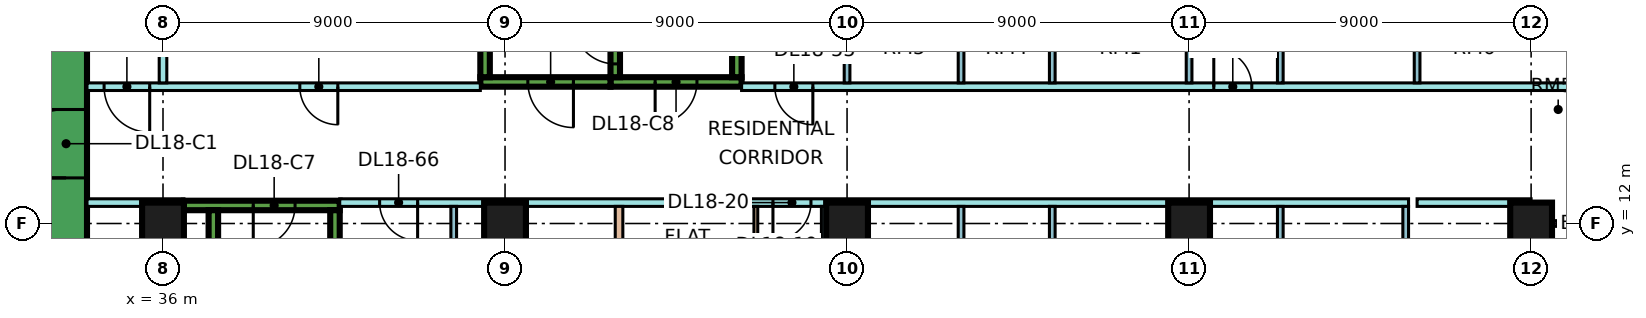
"""IFC4 building model, lengths in metres.
Left out: names, types, materials, properties, quantities, classifications, styles, units other than length and angle.
Written with IfcOpenShell. Run it as: python <this file> out.ifc"""

import sys

from ifc_helpers import new_model, si_unit, direction, frame, frame_2d, origin, origin_2d, place, context, subcontext, project, spatial, rectangle, extrude, element, fill, save


model = new_model("IFC4")
c1 = context("Model", 3, precision=1e-05, world=origin(), true_north=direction((0.0, 1.0)))
c2 = subcontext(c1, "Body", "Model", "MODEL_VIEW")
j1 = project(units=[si_unit("LENGTHUNIT", "METRE"), si_unit("PLANEANGLEUNIT", "RADIAN")], contexts=[c1])
p1 = place(None, origin())
s1 = spatial("IfcSite", under=j1, at=p1, CompositionType="ELEMENT")
p2 = place(p1, origin())
s2 = spatial("IfcBuilding", under=s1, at=p2, CompositionType="ELEMENT")
p3 = place(p2, frame((0.0, 0.0, 82.65)))
s3 = spatial("IfcBuildingStorey", under=s2, at=p3, CompositionType="ELEMENT", Elevation=82.65)
for number, where, z_axis, x_axis in (
    (1, (36.0, 12.0, 0.0), (0.0, 0.0, 1.0), (1.0, 0.0, 0.0)),
    (2, (45.0, 12.0, 0.0), (0.0, 0.0, 1.0), (1.0, 0.0, 0.0)),
    (3, (54.0, 12.0, 0.0), (0.0, 0.0, 1.0), (1.0, 0.0, 0.0)),
    (4, (63.0, 12.0, 0.0), (0.0, 0.0, 1.0), (1.0, 0.0, 0.0)),
    (5, (72.0, 12.0, 0.0), (0.0, 0.0, 1.0), (1.0, 0.0, 0.0)),
):
    element("IfcColumn", number, at=place(p3, frame(where, z_axis=z_axis, x_axis=x_axis)), inside=s3, PredefinedType="COLUMN", context=c2, shape_type="SweptSolid", body=[
        extrude(rectangle(XDim=1.1, YDim=1.1, at=origin_2d()), origin(), (0.0, 0.0, 1.0), 3.75),
    ])
p4 = place(p3, frame((33.45, 8.1, 0.0), z_axis=(0.0, 0.0, 1.0), x_axis=(0.0, 1.0, 0.0)))
e6 = element("IfcWall", 6, at=p4, inside=s3, PredefinedType="SHEAR", context=c2, shape_type="SweptSolid", body=[
    extrude(rectangle(XDim=10.8, YDim=1.1, at=frame_2d((5.4, 0.0))), origin(), (0.0, 0.0, 1.0), 3.75),
])
p5 = place(p4, frame((5.1, 0.0, 0.0)))
e7 = element("IfcOpeningElement", 7, at=p5, cuts=e6, PredefinedType="OPENING", context=c2, shape_type="SweptSolid", body=[
    extrude(rectangle(XDim=1.8, YDim=2.4, at=frame_2d((0.9, 1.2))), frame((0.0, 0.56, 0.0), z_axis=(0.0, -1.0, 0.0), x_axis=(1.0, 0.0, 0.0)), (0.0, 0.0, 1.0), 1.12),
])
p6 = place(p3, frame((36.55, 12.475, 0.0), z_axis=(0.0, 0.0, 1.0), x_axis=(1.0, 0.0, 0.0)))
e8 = element("IfcWall", 8, at=p6, inside=s3, PredefinedType="SHEAR", context=c2, shape_type="SweptSolid", body=[
    extrude(rectangle(XDim=4.1, YDim=0.25, at=frame_2d((2.05, 0.0))), origin(), (0.0, 0.0, 1.0), 3.75),
])
p7 = place(p6, frame((1.825, 0.0, 0.0)))
e9 = element("IfcOpeningElement", 9, at=p7, cuts=e8, PredefinedType="OPENING", context=c2, shape_type="SweptSolid", body=[
    extrude(rectangle(XDim=1.1, YDim=2.2, at=frame_2d((0.55, 1.1))), frame((0.0, 0.135, 0.0), z_axis=(0.0, -1.0, 0.0), x_axis=(1.0, 0.0, 0.0)), (0.0, 0.0, 1.0), 0.27),
])
for number, where, z_axis, x_axis in (
    (10, (37.325, 5.85, 0.0), (0.0, 0.0, 1.0), (0.0, 1.0, 0.0)),
    (11, (40.525, 5.85, 0.0), (0.0, 0.0, 1.0), (0.0, 1.0, 0.0)),
):
    element("IfcWall", number, at=place(p3, frame(where, z_axis=z_axis, x_axis=x_axis)), inside=s3, PredefinedType="SHEAR", context=c2, shape_type="SweptSolid", body=[
        extrude(rectangle(XDim=6.5, YDim=0.25, at=frame_2d((3.25, 0.0))), origin(), (0.0, 0.0, 1.0), 3.75),
    ])
p8 = place(p3, frame((47.775, 15.725, 0.0), z_axis=(0.0, 0.0, 1.0), x_axis=(1.0, 0.0, 0.0)))
e12 = element("IfcWall", 12, at=p8, inside=s3, PredefinedType="SHEAR", context=c2, shape_type="SweptSolid", body=[
    extrude(rectangle(XDim=3.45, YDim=0.25, at=frame_2d((1.725, 0.0))), origin(), (0.0, 0.0, 1.0), 3.75),
])
p9 = place(p8, frame((1.175, 0.0, 0.0)))
e13 = element("IfcOpeningElement", 13, at=p9, cuts=e12, PredefinedType="OPENING", context=c2, shape_type="SweptSolid", body=[
    extrude(rectangle(XDim=1.1, YDim=2.2, at=frame_2d((0.55, 1.1))), frame((0.0, 0.135, 0.0), z_axis=(0.0, -1.0, 0.0), x_axis=(1.0, 0.0, 0.0)), (0.0, 0.0, 1.0), 0.27),
])
p10 = place(p3, frame((47.9, 15.85, 0.0), z_axis=(0.0, 0.0, 1.0), x_axis=(0.0, 1.0, 0.0)))
e14 = element("IfcWall", 14, at=p10, inside=s3, PredefinedType="SHEAR", context=c2, shape_type="SweptSolid", body=[
    extrude(rectangle(XDim=6.5, YDim=0.25, at=frame_2d((3.25, 0.0))), origin(), (0.0, 0.0, 1.0), 3.75),
])
p11 = place(p10, frame((0.35, 0.0, 0.0)))
e15 = element("IfcOpeningElement", 15, at=p11, cuts=e14, PredefinedType="OPENING", context=c2, shape_type="SweptSolid", body=[
    extrude(rectangle(XDim=1.1, YDim=2.2, at=frame_2d((0.55, 1.1))), frame((0.0, 0.135, 0.0), z_axis=(0.0, -1.0, 0.0), x_axis=(1.0, 0.0, 0.0)), (0.0, 0.0, 1.0), 0.27),
])
p12 = place(p3, frame((51.1, 15.85, 0.0), z_axis=(0.0, 0.0, 1.0), x_axis=(0.0, 1.0, 0.0)))
e16 = element("IfcWall", 16, at=p12, inside=s3, PredefinedType="SHEAR", context=c2, shape_type="SweptSolid", body=[
    extrude(rectangle(XDim=6.5, YDim=0.25, at=frame_2d((3.25, 0.0))), origin(), (0.0, 0.0, 1.0), 3.75),
])
p13 = place(p3, frame((44.35, 15.725, 0.0), z_axis=(0.0, 0.0, 1.0), x_axis=(1.0, 0.0, 0.0)))
e17 = element("IfcWall", 17, at=p13, inside=s3, PredefinedType="SHEAR", context=c2, shape_type="SweptSolid", body=[
    extrude(rectangle(XDim=3.425, YDim=0.25, at=frame_2d((1.712, 0.0))), origin(), (0.0, 0.0, 1.0), 3.75),
])
p14 = place(p13, frame((1.25, 0.0, 0.0)))
e18 = element("IfcOpeningElement", 18, at=p14, cuts=e17, PredefinedType="OPENING", context=c2, shape_type="SweptSolid", body=[
    extrude(rectangle(XDim=1.2, YDim=2.2, at=frame_2d((0.6, 1.1))), frame((0.0, 0.135, 0.0), z_axis=(0.0, -1.0, 0.0), x_axis=(1.0, 0.0, 0.0)), (0.0, 0.0, 1.0), 0.27),
])
p15 = place(p3, frame((44.475, 15.85, 0.0), z_axis=(0.0, 0.0, 1.0), x_axis=(0.0, 1.0, 0.0)))
e19 = element("IfcWall", 19, at=p15, inside=s3, PredefinedType="SHEAR", context=c2, shape_type="SweptSolid", body=[
    extrude(rectangle(XDim=6.5, YDim=0.25, at=frame_2d((3.25, 0.0))), origin(), (0.0, 0.0, 1.0), 3.75),
])
p16 = place(p15, frame((1.75, 0.0, 0.0)))
e20 = element("IfcOpeningElement", 20, at=p16, cuts=e19, PredefinedType="OPENING", context=c2, shape_type="SweptSolid", body=[
    extrude(rectangle(XDim=1.1, YDim=2.2, at=frame_2d((0.55, 1.1))), frame((0.0, 0.135, 0.0), z_axis=(0.0, -1.0, 0.0), x_axis=(1.0, 0.0, 0.0)), (0.0, 0.0, 1.0), 0.27),
])
p17 = place(p15, frame((4.3, 0.0, 0.0)))
e21 = element("IfcOpeningElement", 21, at=p17, cuts=e19, PredefinedType="OPENING", context=c2, shape_type="SweptSolid", body=[
    extrude(rectangle(XDim=1.1, YDim=2.2, at=frame_2d((0.55, 1.1))), frame((0.0, 0.135, 0.0), z_axis=(0.0, -1.0, 0.0), x_axis=(1.0, 0.0, 0.0)), (0.0, 0.0, 1.0), 0.27),
])
p18 = place(p3, frame((72.0, 1.575, 0.0), z_axis=(0.0, 0.0, 1.0), x_axis=(0.0, 1.0, 0.0)))
e22 = element("IfcWall", 22, at=p18, inside=s3, PredefinedType="SOLIDWALL", context=c2, shape_type="SweptSolid", body=[
    extrude(rectangle(XDim=10.35, YDim=0.15, at=frame_2d((5.175, 0.0))), origin(), (0.0, 0.0, 1.0), 3.3),
])
p19 = place(p18, frame((1.887, 0.0, 0.0)))
e23 = element("IfcOpeningElement", 23, at=p19, cuts=e22, PredefinedType="OPENING", context=c2, shape_type="SweptSolid", body=[
    extrude(rectangle(XDim=1.8, YDim=2.4, at=frame_2d((0.9, 1.2))), frame((0.0, 0.085, 0.0), z_axis=(0.0, -1.0, 0.0), x_axis=(1.0, 0.0, 0.0)), (0.0, 0.0, 1.0), 0.17),
])
p20 = place(p18, frame((7.675, 0.0, 1.7)))
e24 = element("IfcOpeningElement", 24, at=p20, cuts=e22, PredefinedType="OPENING", context=c2, shape_type="SweptSolid", body=[
    extrude(rectangle(XDim=1.2, YDim=0.9, at=frame_2d((0.6, 0.45))), frame((0.0, 0.085, 0.0), z_axis=(0.0, -1.0, 0.0), x_axis=(1.0, 0.0, 0.0)), (0.0, 0.0, 1.0), 0.17),
])
p21 = place(p3, frame((73.5, 12.0, 0.0), z_axis=(0.0, 0.0, 1.0), x_axis=(-1.0, 0.0, 0.0)))
e25 = element("IfcWall", 25, at=p21, inside=s3, PredefinedType="SOLIDWALL", context=c2, shape_type="SweptSolid", body=[
    extrude(rectangle(XDim=1.5, YDim=0.15, at=frame_2d((0.75, 0.0))), origin(), (0.0, 0.0, 1.0), 3.3),
])
p22 = place(p3, frame((34.0, 12.55, 0.0), z_axis=(0.0, 0.0, 1.0), x_axis=(1.0, 0.0, 0.0)))
e26 = element("IfcWall", 26, at=p22, inside=s3, PredefinedType="PARTITIONING", context=c2, shape_type="SweptSolid", body=[
    extrude(rectangle(XDim=2.551, YDim=0.2, at=frame_2d((1.275, 0.0))), origin(), (0.0, 0.0, 1.0), 3.3),
])
p23 = place(p3, frame((34.0, 15.6, 0.0), z_axis=(0.0, 0.0, 1.0), x_axis=(1.0, 0.0, 0.0)))
e27 = element("IfcWall", 27, at=p23, inside=s3, PredefinedType="PARTITIONING", context=c2, shape_type="SweptSolid", body=[
    extrude(rectangle(XDim=10.35, YDim=0.2, at=frame_2d((5.175, 0.0))), origin(), (0.0, 0.0, 1.0), 3.3),
])
p24 = place(p23, frame((5.6, 0.0, 0.0)))
e28 = element("IfcOpeningElement", 28, at=p24, cuts=e27, PredefinedType="OPENING", context=c2, shape_type="SweptSolid", body=[
    extrude(rectangle(XDim=1.0, YDim=2.1, at=frame_2d((0.5, 1.05))), frame((0.0, 0.11, 0.0), z_axis=(0.0, -1.0, 0.0), x_axis=(1.0, 0.0, 0.0)), (0.0, 0.0, 1.0), 0.22),
])
p25 = place(p23, frame((0.45, 0.0, 0.0)))
e29 = element("IfcOpeningElement", 29, at=p25, cuts=e27, PredefinedType="OPENING", context=c2, shape_type="SweptSolid", body=[
    extrude(rectangle(XDim=1.2, YDim=2.1, at=frame_2d((0.6, 1.05))), frame((0.0, 0.11, 0.0), z_axis=(0.0, -1.0, 0.0), x_axis=(1.0, 0.0, 0.0)), (0.0, 0.0, 1.0), 0.22),
])
p26 = place(p3, frame((36.0, 15.7, 0.0), z_axis=(0.0, 0.0, 1.0), x_axis=(0.0, 1.0, 0.0)))
e30 = element("IfcWall", 30, at=p26, inside=s3, PredefinedType="PARTITIONING", context=c2, shape_type="SweptSolid", body=[
    extrude(rectangle(XDim=8.3, YDim=0.2, at=frame_2d((4.15, 0.0))), origin(), (0.0, 0.0, 1.0), 3.3),
])
p27 = place(p3, frame((40.65, 12.55, 0.0), z_axis=(0.0, 0.0, 1.0), x_axis=(1.0, 0.0, 0.0)))
e31 = element("IfcWall", 31, at=p27, inside=s3, PredefinedType="PARTITIONING", context=c2, shape_type="SweptSolid", body=[
    extrude(rectangle(XDim=28.125, YDim=0.2, at=frame_2d((14.062, 0.0))), origin(), (0.0, 0.0, 1.0), 3.3),
])
p28 = place(p27, frame((11.4, 0.0, 0.0)))
e32 = element("IfcOpeningElement", 32, at=p28, cuts=e31, PredefinedType="OPENING", context=c2, shape_type="SweptSolid", body=[
    extrude(rectangle(XDim=1.0, YDim=2.1, at=frame_2d((0.5, 1.05))), frame((0.0, 0.11, 0.0), z_axis=(0.0, -1.0, 0.0), x_axis=(1.0, 0.0, 0.0)), (0.0, 0.0, 1.0), 0.22),
])
p29 = place(p27, frame((1.05, 0.0, 0.0)))
e33 = element("IfcOpeningElement", 33, at=p29, cuts=e31, PredefinedType="OPENING", context=c2, shape_type="SweptSolid", body=[
    extrude(rectangle(XDim=1.0, YDim=2.1, at=frame_2d((0.5, 1.05))), frame((0.0, 0.11, 0.0), z_axis=(0.0, -1.0, 0.0), x_axis=(1.0, 0.0, 0.0)), (0.0, 0.0, 1.0), 0.22),
])
p30 = place(p3, frame((43.65, 5.825, 0.0), z_axis=(0.0, 0.0, 1.0), x_axis=(0.0, 1.0, 0.0)))
e34 = element("IfcWall", 34, at=p30, inside=s3, PredefinedType="PARTITIONING", context=c2, shape_type="SweptSolid", body=[
    extrude(rectangle(XDim=6.625, YDim=0.15, at=frame_2d((3.312, 0.0))), origin(), (0.0, 0.0, 1.0), 3.3),
])
p31 = place(p30, frame((4.425, 0.0, 0.0)))
e35 = element("IfcOpeningElement", 35, at=p31, cuts=e34, PredefinedType="OPENING", context=c2, shape_type="SweptSolid", body=[
    extrude(rectangle(XDim=0.9, YDim=2.1, at=frame_2d((0.45, 1.05))), frame((0.0, 0.085, 0.0), z_axis=(0.0, -1.0, 0.0), x_axis=(1.0, 0.0, 0.0)), (0.0, 0.0, 1.0), 0.17),
])
p32 = place(p3, frame((48.0, 0.0, 0.0), z_axis=(0.0, 0.0, 1.0), x_axis=(0.0, 1.0, 0.0)))
e36 = element("IfcWall", 36, at=p32, inside=s3, PredefinedType="PARTITIONING", context=c2, shape_type="SweptSolid", body=[
    extrude(rectangle(XDim=12.45, YDim=0.2, at=frame_2d((6.225, 0.0))), origin(), (0.0, 0.0, 1.0), 3.3),
])
p33 = place(p3, frame((51.225, 15.6, 0.0), z_axis=(0.0, 0.0, 1.0), x_axis=(1.0, 0.0, 0.0)))
e37 = element("IfcWall", 37, at=p33, inside=s3, PredefinedType="PARTITIONING", context=c2, shape_type="SweptSolid", body=[
    extrude(rectangle(XDim=22.125, YDim=0.2, at=frame_2d((11.062, 0.0))), origin(), (0.0, 0.0, 1.0), 3.3),
])
p34 = place(p33, frame((12.425, 0.0, 0.0)))
e38 = element("IfcOpeningElement", 38, at=p34, cuts=e37, PredefinedType="OPENING", context=c2, shape_type="SweptSolid", body=[
    extrude(rectangle(XDim=1.0, YDim=2.1, at=frame_2d((0.5, 1.05))), frame((0.0, 0.11, 0.0), z_axis=(0.0, -1.0, 0.0), x_axis=(1.0, 0.0, 0.0)), (0.0, 0.0, 1.0), 0.22),
])
p35 = place(p33, frame((0.875, 0.0, 0.0)))
e39 = element("IfcOpeningElement", 39, at=p35, cuts=e37, PredefinedType="OPENING", context=c2, shape_type="SweptSolid", body=[
    extrude(rectangle(XDim=1.0, YDim=2.1, at=frame_2d((0.5, 1.05))), frame((0.0, 0.11, 0.0), z_axis=(0.0, -1.0, 0.0), x_axis=(1.0, 0.0, 0.0)), (0.0, 0.0, 1.0), 0.22),
])
p36 = place(p3, frame((51.6, 8.3, 0.0), z_axis=(0.0, 0.0, 1.0), x_axis=(0.0, 1.0, 0.0)))
e40 = element("IfcWall", 40, at=p36, inside=s3, PredefinedType="PARTITIONING", context=c2, shape_type="SweptSolid", body=[
    extrude(rectangle(XDim=4.15, YDim=0.1, at=frame_2d((2.075, 0.0))), origin(), (0.0, 0.0, 1.0), 3.3),
])
p37 = place(p36, frame((1.7, 0.0, 0.0)))
e41 = element("IfcOpeningElement", 41, at=p37, cuts=e40, PredefinedType="OPENING", context=c2, shape_type="SweptSolid", body=[
    extrude(rectangle(XDim=0.9, YDim=2.1, at=frame_2d((0.45, 1.05))), frame((0.0, 0.06, 0.0), z_axis=(0.0, -1.0, 0.0), x_axis=(1.0, 0.0, 0.0)), (0.0, 0.0, 1.0), 0.12),
])
p38 = place(p3, frame((53.4, 8.425, 0.0), z_axis=(0.0, 0.0, 1.0), x_axis=(0.0, 1.0, 0.0)))
e42 = element("IfcWall", 42, at=p38, inside=s3, PredefinedType="PARTITIONING", context=c2, shape_type="SweptSolid", body=[
    extrude(rectangle(XDim=4.025, YDim=0.15, at=frame_2d((2.012, 0.0))), origin(), (0.0, 0.0, 1.0), 3.3),
])
p39 = place(p38, frame((1.575, 0.0, 0.0)))
e43 = element("IfcOpeningElement", 43, at=p39, cuts=e42, PredefinedType="OPENING", context=c2, shape_type="SweptSolid", body=[
    extrude(rectangle(XDim=0.8, YDim=2.1, at=frame_2d((0.4, 1.05))), frame((0.0, 0.085, 0.0), z_axis=(0.0, -1.0, 0.0), x_axis=(1.0, 0.0, 0.0)), (0.0, 0.0, 1.0), 0.17),
])
p40 = place(p3, frame((54.0, 15.7, 0.0), z_axis=(0.0, 0.0, 1.0), x_axis=(0.0, 1.0, 0.0)))
e44 = element("IfcWall", 44, at=p40, inside=s3, PredefinedType="PARTITIONING", context=c2, shape_type="SweptSolid", body=[
    extrude(rectangle(XDim=2.9, YDim=0.15, at=frame_2d((1.45, 0.0))), origin(), (0.0, 0.0, 1.0), 3.3),
])
p41 = place(p3, frame((57.0, 8.425, 0.0), z_axis=(0.0, 0.0, 1.0), x_axis=(0.0, 1.0, 0.0)))
e45 = element("IfcWall", 45, at=p41, inside=s3, PredefinedType="PARTITIONING", context=c2, shape_type="SweptSolid", body=[
    extrude(rectangle(XDim=4.025, YDim=0.15, at=frame_2d((2.012, 0.0))), origin(), (0.0, 0.0, 1.0), 3.3),
])
p42 = place(p3, frame((57.0, 15.7, 0.0), z_axis=(0.0, 0.0, 1.0), x_axis=(0.0, 1.0, 0.0)))
e46 = element("IfcWall", 46, at=p42, inside=s3, PredefinedType="PARTITIONING", context=c2, shape_type="SweptSolid", body=[
    extrude(rectangle(XDim=2.825, YDim=0.15, at=frame_2d((1.413, 0.0))), origin(), (0.0, 0.0, 1.0), 3.3),
])
p43 = place(p3, frame((59.4, 8.425, 0.0), z_axis=(0.0, 0.0, 1.0), x_axis=(0.0, 1.0, 0.0)))
e47 = element("IfcWall", 47, at=p43, inside=s3, PredefinedType="PARTITIONING", context=c2, shape_type="SweptSolid", body=[
    extrude(rectangle(XDim=4.025, YDim=0.15, at=frame_2d((2.012, 0.0))), origin(), (0.0, 0.0, 1.0), 3.3),
])
for number, where, z_axis, x_axis in (
    (48, (59.4, 15.7, 0.0), (0.0, 0.0, 1.0), (0.0, 1.0, 0.0)),
    (49, (63.0, 15.7, 0.0), (0.0, 0.0, 1.0), (0.0, 1.0, 0.0)),
):
    element("IfcWall", number, at=place(p3, frame(where, z_axis=z_axis, x_axis=x_axis)), inside=s3, PredefinedType="PARTITIONING", context=c2, shape_type="SweptSolid", body=[
        extrude(rectangle(XDim=2.825, YDim=0.15, at=frame_2d((1.413, 0.0))), origin(), (0.0, 0.0, 1.0), 3.3),
    ])
p44 = place(p3, frame((65.4, 8.425, 0.0), z_axis=(0.0, 0.0, 1.0), x_axis=(0.0, 1.0, 0.0)))
e50 = element("IfcWall", 50, at=p44, inside=s3, PredefinedType="PARTITIONING", context=c2, shape_type="SweptSolid", body=[
    extrude(rectangle(XDim=4.025, YDim=0.15, at=frame_2d((2.012, 0.0))), origin(), (0.0, 0.0, 1.0), 3.3),
])
p45 = place(p3, frame((65.4, 15.7, 0.0), z_axis=(0.0, 0.0, 1.0), x_axis=(0.0, 1.0, 0.0)))
e51 = element("IfcWall", 51, at=p45, inside=s3, PredefinedType="PARTITIONING", context=c2, shape_type="SweptSolid", body=[
    extrude(rectangle(XDim=2.825, YDim=0.15, at=frame_2d((1.413, 0.0))), origin(), (0.0, 0.0, 1.0), 3.3),
])
p46 = place(p3, frame((68.7, 8.425, 0.0), z_axis=(0.0, 0.0, 1.0), x_axis=(0.0, 1.0, 0.0)))
e52 = element("IfcWall", 52, at=p46, inside=s3, PredefinedType="PARTITIONING", context=c2, shape_type="SweptSolid", body=[
    extrude(rectangle(XDim=4.025, YDim=0.15, at=frame_2d((2.012, 0.0))), origin(), (0.0, 0.0, 1.0), 3.3),
])
p47 = place(p3, frame((69.0, 12.55, 0.0), z_axis=(0.0, 0.0, 1.0), x_axis=(1.0, 0.0, 0.0)))
e53 = element("IfcWall", 53, at=p47, inside=s3, PredefinedType="PARTITIONING", context=c2, shape_type="SweptSolid", body=[
    extrude(rectangle(XDim=3.0, YDim=0.2, at=frame_2d((1.5, 0.0))), origin(), (0.0, 0.0, 1.0), 3.3),
])
p48 = place(p3, frame((69.0, 15.7, 0.0), z_axis=(0.0, 0.0, 1.0), x_axis=(0.0, 1.0, 0.0)))
e54 = element("IfcWall", 54, at=p48, inside=s3, PredefinedType="PARTITIONING", context=c2, shape_type="SweptSolid", body=[
    extrude(rectangle(XDim=2.825, YDim=0.15, at=frame_2d((1.413, 0.0))), origin(), (0.0, 0.0, 1.0), 3.3),
])
p49 = place(p5, origin())
e55 = element("IfcDoor", 55, at=p49, inside=s3, OperationType="DOUBLE_DOOR_SINGLE_SWING", PredefinedType="DOOR", context=c2, shape_type="SweptSolid", body=[
    extrude(rectangle(XDim=1.8, YDim=2.4, at=frame_2d((0.9, 1.2))), frame((0.0, 0.025, 0.0), z_axis=(0.0, -1.0, 0.0), x_axis=(1.0, 0.0, 0.0)), (0.0, 0.0, 1.0), 0.05),
])
fill(e7, e55)
p50 = place(p7, frame((1.1, 0.0, 0.0), z_axis=(0.0, 0.0, 1.0), x_axis=(-1.0, 0.0, 0.0)))
e56 = element("IfcDoor", 56, at=p50, inside=s3, OperationType="SINGLE_SWING_LEFT", PredefinedType="DOOR", context=c2, shape_type="SweptSolid", body=[
    extrude(rectangle(XDim=1.1, YDim=2.2, at=frame_2d((0.55, 1.1))), frame((0.0, 0.025, 0.0), z_axis=(0.0, -1.0, 0.0), x_axis=(1.0, 0.0, 0.0)), (0.0, 0.0, 1.0), 0.05),
])
fill(e9, e56)
p51 = place(p9, frame((1.1, 0.0, 0.0), z_axis=(0.0, 0.0, 1.0), x_axis=(-1.0, 0.0, 0.0)))
e57 = element("IfcDoor", 57, at=p51, inside=s3, OperationType="SINGLE_SWING_LEFT", PredefinedType="DOOR", context=c2, shape_type="SweptSolid", body=[
    extrude(rectangle(XDim=1.1, YDim=2.2, at=frame_2d((0.55, 1.1))), frame((0.0, 0.025, 0.0), z_axis=(0.0, -1.0, 0.0), x_axis=(1.0, 0.0, 0.0)), (0.0, 0.0, 1.0), 0.05),
])
fill(e13, e57)
p52 = place(p14, origin())
e58 = element("IfcDoor", 58, at=p52, inside=s3, OperationType="SINGLE_SWING_RIGHT", PredefinedType="DOOR", context=c2, shape_type="SweptSolid", body=[
    extrude(rectangle(XDim=1.2, YDim=2.2, at=frame_2d((0.6, 1.1))), frame((0.0, 0.025, 0.0), z_axis=(0.0, -1.0, 0.0), x_axis=(1.0, 0.0, 0.0)), (0.0, 0.0, 1.0), 0.05),
])
fill(e18, e58)
p53 = place(p11, frame((1.1, 0.0, 0.0), z_axis=(0.0, 0.0, 1.0), x_axis=(-1.0, 0.0, 0.0)))
e59 = element("IfcDoor", 59, at=p53, inside=s3, OperationType="SINGLE_SWING_RIGHT", PredefinedType="DOOR", context=c2, shape_type="SweptSolid", body=[
    extrude(rectangle(XDim=1.1, YDim=2.2, at=frame_2d((0.55, 1.1))), frame((0.0, 0.025, 0.0), z_axis=(0.0, -1.0, 0.0), x_axis=(1.0, 0.0, 0.0)), (0.0, 0.0, 1.0), 0.05),
])
fill(e15, e59)
p54 = place(p24, origin())
e60 = element("IfcDoor", 60, at=p54, inside=s3, OperationType="SINGLE_SWING_RIGHT", PredefinedType="DOOR", context=c2, shape_type="SweptSolid", body=[
    extrude(rectangle(XDim=1.0, YDim=2.1, at=frame_2d((0.5, 1.05))), frame((0.0, 0.025, 0.0), z_axis=(0.0, -1.0, 0.0), x_axis=(1.0, 0.0, 0.0)), (0.0, 0.0, 1.0), 0.05),
])
fill(e28, e60)
p55 = place(p34, origin())
e61 = element("IfcDoor", 61, at=p55, inside=s3, OperationType="SINGLE_SWING_LEFT", PredefinedType="DOOR", context=c2, shape_type="SweptSolid", body=[
    extrude(rectangle(XDim=1.0, YDim=2.1, at=frame_2d((0.5, 1.05))), frame((0.0, 0.025, 0.0), z_axis=(0.0, -1.0, 0.0), x_axis=(1.0, 0.0, 0.0)), (0.0, 0.0, 1.0), 0.05),
])
fill(e38, e61)
p56 = place(p28, frame((1.0, 0.0, 0.0), z_axis=(0.0, 0.0, 1.0), x_axis=(-1.0, 0.0, 0.0)))
e62 = element("IfcDoor", 62, at=p56, inside=s3, OperationType="SINGLE_SWING_LEFT", PredefinedType="DOOR", context=c2, shape_type="SweptSolid", body=[
    extrude(rectangle(XDim=1.0, YDim=2.1, at=frame_2d((0.5, 1.05))), frame((0.0, 0.025, 0.0), z_axis=(0.0, -1.0, 0.0), x_axis=(1.0, 0.0, 0.0)), (0.0, 0.0, 1.0), 0.05),
])
fill(e32, e62)
p57 = place(p25, origin())
e63 = element("IfcDoor", 63, at=p57, inside=s3, OperationType="SINGLE_SWING_RIGHT", PredefinedType="DOOR", context=c2, shape_type="SweptSolid", body=[
    extrude(rectangle(XDim=1.2, YDim=2.1, at=frame_2d((0.6, 1.05))), frame((0.0, 0.025, 0.0), z_axis=(0.0, -1.0, 0.0), x_axis=(1.0, 0.0, 0.0)), (0.0, 0.0, 1.0), 0.05),
])
fill(e29, e63)
p58 = place(p35, origin())
e64 = element("IfcDoor", 64, at=p58, inside=s3, OperationType="SINGLE_SWING_RIGHT", PredefinedType="DOOR", context=c2, shape_type="SweptSolid", body=[
    extrude(rectangle(XDim=1.0, YDim=2.1, at=frame_2d((0.5, 1.05))), frame((0.0, 0.025, 0.0), z_axis=(0.0, -1.0, 0.0), x_axis=(1.0, 0.0, 0.0)), (0.0, 0.0, 1.0), 0.05),
])
fill(e39, e64)
p59 = place(p29, origin())
e65 = element("IfcDoor", 65, at=p59, inside=s3, OperationType="SINGLE_SWING_RIGHT", PredefinedType="DOOR", context=c2, shape_type="SweptSolid", body=[
    extrude(rectangle(XDim=1.0, YDim=2.1, at=frame_2d((0.5, 1.05))), frame((0.0, 0.025, 0.0), z_axis=(0.0, -1.0, 0.0), x_axis=(1.0, 0.0, 0.0)), (0.0, 0.0, 1.0), 0.05),
])
fill(e33, e65)
save(model, sys.argv[1])
